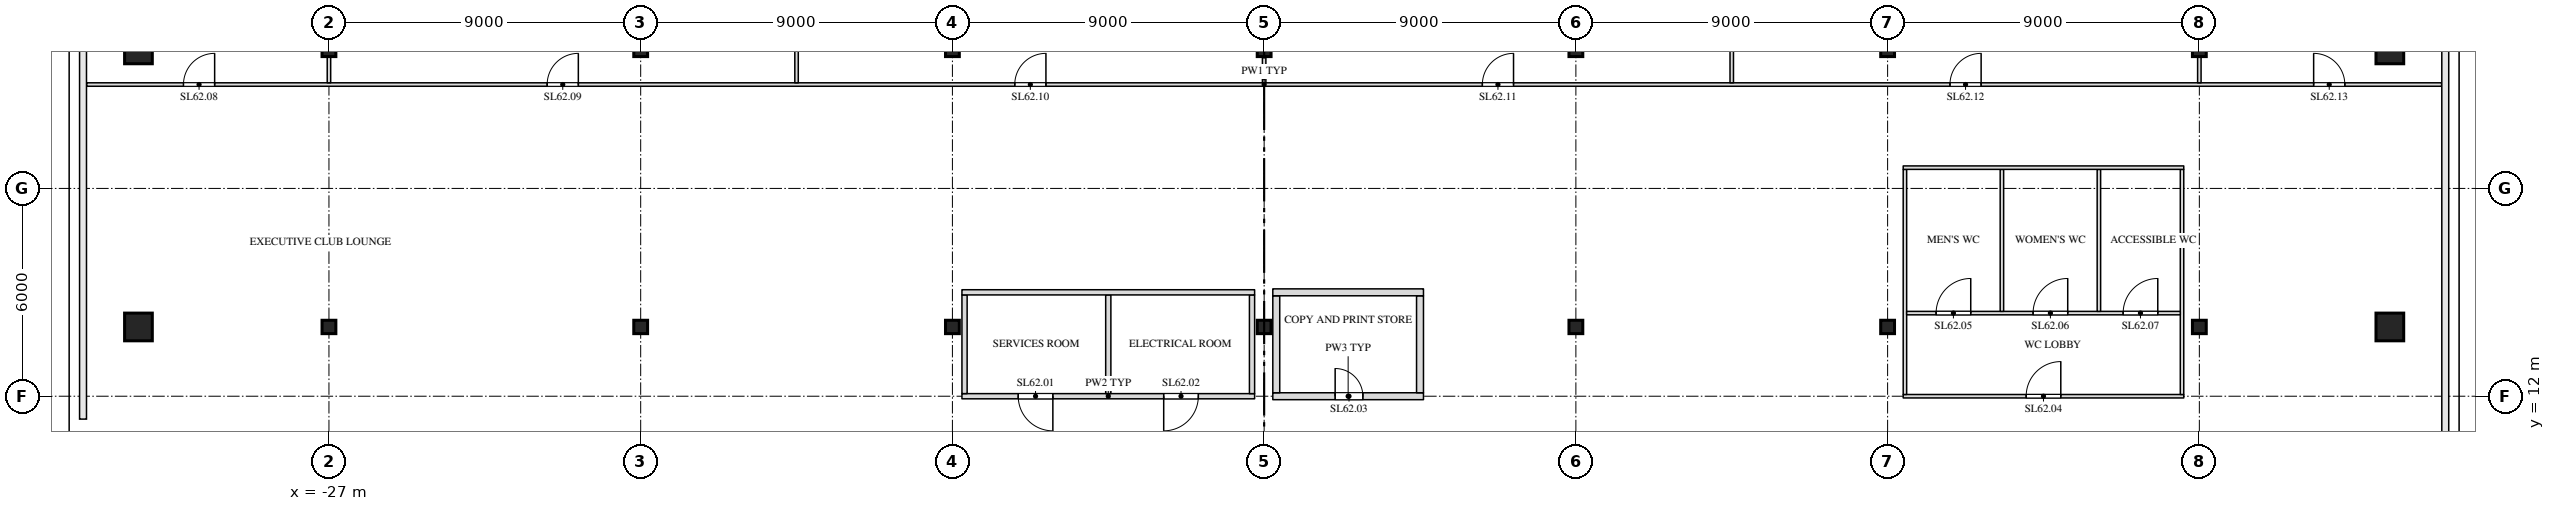
"""IFC4 building model, lengths in metres.
Left out: names, types, materials, properties, quantities, classifications, styles, units other than length and angle.
Written with IfcOpenShell. Run it as: python <this file> out.ifc"""

import sys

from ifc_helpers import new_model, si_unit, direction, frame, frame_2d, origin, origin_2d, place, context, subcontext, project, spatial, rectangle, i_section, extrude, element, fill, save


model = new_model("IFC4")
c1 = context("Model", 3, precision=1e-05, world=origin(), true_north=direction((0.0, 1.0)))
c2 = subcontext(c1, "Body", "Model", "MODEL_VIEW")
j1 = project(units=[si_unit("LENGTHUNIT", "METRE"), si_unit("PLANEANGLEUNIT", "RADIAN")], contexts=[c1])
p1 = place(None, origin())
s1 = spatial("IfcSite", under=j1, at=p1, CompositionType="ELEMENT")
p2 = place(p1, origin())
s2 = spatial("IfcBuilding", under=s1, at=p2, CompositionType="ELEMENT")
p3 = place(p2, frame((0.0, 0.0, 264.5)))
s3 = spatial("IfcBuildingStorey", under=s2, at=p3, CompositionType="ELEMENT", Elevation=264.5)
p4 = place(p3, frame((-32.5, 14.0, 0.0), z_axis=(0.0, 0.0, 1.0), x_axis=(1.0, 0.0, 0.0)))
e1 = element("IfcColumn", 1, at=p4, inside=s3, PredefinedType="COLUMN", context=c2, shape_type="SweptSolid", body=[
    extrude(rectangle(XDim=0.8, YDim=0.8, at=origin_2d()), origin(), (0.0, 0.0, 1.0), 4.0),
])
for number, where, z_axis, x_axis in (
    (2, (-27.0, 14.0, 0.0), (0.0, 0.0, 1.0), (1.0, 0.0, 0.0)),
    (3, (-18.0, 14.0, 0.0), (0.0, 0.0, 1.0), (1.0, 0.0, 0.0)),
    (4, (-9.0, 14.0, 0.0), (0.0, 0.0, 1.0), (1.0, 0.0, 0.0)),
    (5, (0.0, 14.0, 0.0), (0.0, 0.0, 1.0), (1.0, 0.0, 0.0)),
    (6, (9.0, 14.0, 0.0), (0.0, 0.0, 1.0), (1.0, 0.0, 0.0)),
    (7, (18.0, 14.0, 0.0), (0.0, 0.0, 1.0), (1.0, 0.0, 0.0)),
    (8, (27.0, 14.0, 0.0), (0.0, 0.0, 1.0), (1.0, 0.0, 0.0)),
):
    element("IfcColumn", number, at=place(p3, frame(where, z_axis=z_axis, x_axis=x_axis)), inside=s3, PredefinedType="COLUMN", context=c2, shape_type="SweptSolid", body=[
        extrude(i_section(OverallWidth=0.399, OverallDepth=0.386, WebThickness=0.021, FlangeThickness=0.033, at=origin_2d()), origin(), (0.0, 0.0, 1.0), 4.0),
    ])
for number, where, z_axis, x_axis in (
    (9, (32.5, 14.0, 0.0), (0.0, 0.0, 1.0), (1.0, 0.0, 0.0)),
    (10, (-32.5, 22.0, 0.0), (0.0, 0.0, 1.0), (1.0, 0.0, 0.0)),
):
    element("IfcColumn", number, at=place(p3, frame(where, z_axis=z_axis, x_axis=x_axis)), inside=s3, PredefinedType="COLUMN", context=c2, shape_type="SweptSolid", body=[
        extrude(rectangle(XDim=0.8, YDim=0.8, at=origin_2d()), origin(), (0.0, 0.0, 1.0), 4.0),
    ])
for number, where, z_axis, x_axis in (
    (11, (-27.0, 22.0, 0.0), (0.0, 0.0, 1.0), (1.0, 0.0, 0.0)),
    (12, (-18.0, 22.0, 0.0), (0.0, 0.0, 1.0), (1.0, 0.0, 0.0)),
    (13, (-9.0, 22.0, 0.0), (0.0, 0.0, 1.0), (1.0, 0.0, 0.0)),
    (14, (0.0, 22.0, 0.0), (0.0, 0.0, 1.0), (1.0, 0.0, 0.0)),
    (15, (9.0, 22.0, 0.0), (0.0, 0.0, 1.0), (1.0, 0.0, 0.0)),
    (16, (18.0, 22.0, 0.0), (0.0, 0.0, 1.0), (1.0, 0.0, 0.0)),
    (17, (27.0, 22.0, 0.0), (0.0, 0.0, 1.0), (1.0, 0.0, 0.0)),
):
    element("IfcColumn", number, at=place(p3, frame(where, z_axis=z_axis, x_axis=x_axis)), inside=s3, PredefinedType="COLUMN", context=c2, shape_type="SweptSolid", body=[
        extrude(i_section(OverallWidth=0.399, OverallDepth=0.386, WebThickness=0.021, FlangeThickness=0.033, at=origin_2d()), origin(), (0.0, 0.0, 1.0), 4.0),
    ])
p5 = place(p3, frame((32.5, 22.0, 0.0), z_axis=(0.0, 0.0, 1.0), x_axis=(1.0, 0.0, 0.0)))
e18 = element("IfcColumn", 18, at=p5, inside=s3, PredefinedType="COLUMN", context=c2, shape_type="SweptSolid", body=[
    extrude(rectangle(XDim=0.8, YDim=0.8, at=origin_2d()), origin(), (0.0, 0.0, 1.0), 4.0),
])
p6 = place(p3, frame((-8.725, 12.0, 0.0), z_axis=(0.0, 0.0, 1.0), x_axis=(1.0, 0.0, 0.0)))
e19 = element("IfcWall", 19, at=p6, inside=s3, PredefinedType="PARTITIONING", context=c2, shape_type="SweptSolid", body=[
    extrude(rectangle(XDim=8.45, YDim=0.15, at=frame_2d((4.225, 0.0))), origin(), (0.0, 0.0, 1.0), 3.65),
])
p7 = place(p6, frame((1.625, 0.0, 0.0)))
e20 = element("IfcOpeningElement", 20, at=p7, cuts=e19, PredefinedType="OPENING", context=c2, shape_type="SweptSolid", body=[
    extrude(rectangle(XDim=1.0, YDim=2.1, at=frame_2d((0.5, 1.05))), frame((0.0, 0.087, 0.0), z_axis=(0.0, -1.0, 0.0), x_axis=(1.0, 0.0, 0.0)), (0.0, 0.0, 1.0), 0.174),
])
p8 = place(p6, frame((5.825, 0.0, 0.0)))
e21 = element("IfcOpeningElement", 21, at=p8, cuts=e19, PredefinedType="OPENING", context=c2, shape_type="SweptSolid", body=[
    extrude(rectangle(XDim=1.0, YDim=2.1, at=frame_2d((0.5, 1.05))), frame((0.0, 0.087, 0.0), z_axis=(0.0, -1.0, 0.0), x_axis=(1.0, 0.0, 0.0)), (0.0, 0.0, 1.0), 0.174),
])
for number, where, z_axis, x_axis in (
    (22, (-8.65, 12.075, 0.0), (0.0, 0.0, 1.0), (0.0, 1.0, 0.0)),
    (23, (-4.5, 12.075, 0.0), (0.0, 0.0, 1.0), (0.0, 1.0, 0.0)),
    (24, (-0.35, 12.075, 0.0), (0.0, 0.0, 1.0), (0.0, 1.0, 0.0)),
):
    element("IfcWall", number, at=place(p3, frame(where, z_axis=z_axis, x_axis=x_axis)), inside=s3, PredefinedType="PARTITIONING", context=c2, shape_type="SweptSolid", body=[
        extrude(rectangle(XDim=2.85, YDim=0.15, at=frame_2d((1.425, 0.0))), origin(), (0.0, 0.0, 1.0), 3.65),
    ])
p9 = place(p3, frame((0.25, 12.0, 0.0), z_axis=(0.0, 0.0, 1.0), x_axis=(1.0, 0.0, 0.0)))
e25 = element("IfcWall", 25, at=p9, inside=s3, PredefinedType="PARTITIONING", context=c2, shape_type="SweptSolid", body=[
    extrude(rectangle(XDim=4.35, YDim=0.2, at=frame_2d((2.175, 0.0))), origin(), (0.0, 0.0, 1.0), 3.65),
])
p10 = place(p9, frame((1.8, 0.0, 0.0)))
e26 = element("IfcOpeningElement", 26, at=p10, cuts=e25, PredefinedType="OPENING", context=c2, shape_type="SweptSolid", body=[
    extrude(rectangle(XDim=0.8, YDim=2.1, at=frame_2d((0.4, 1.05))), frame((0.0, 0.112, 0.0), z_axis=(0.0, -1.0, 0.0), x_axis=(1.0, 0.0, 0.0)), (0.0, 0.0, 1.0), 0.224),
])
for number, where, z_axis, x_axis in (
    (27, (0.35, 12.1, 0.0), (0.0, 0.0, 1.0), (0.0, 1.0, 0.0)),
    (28, (4.5, 12.1, 0.0), (0.0, 0.0, 1.0), (0.0, 1.0, 0.0)),
):
    element("IfcWall", number, at=place(p3, frame(where, z_axis=z_axis, x_axis=x_axis)), inside=s3, PredefinedType="PARTITIONING", context=c2, shape_type="SweptSolid", body=[
        extrude(rectangle(XDim=2.8, YDim=0.2, at=frame_2d((1.4, 0.0))), origin(), (0.0, 0.0, 1.0), 3.65),
    ])
p11 = place(p3, frame((18.45, 12.0, 0.0), z_axis=(0.0, 0.0, 1.0), x_axis=(1.0, 0.0, 0.0)))
e29 = element("IfcWall", 29, at=p11, inside=s3, PredefinedType="PARTITIONING", context=c2, shape_type="SweptSolid", body=[
    extrude(rectangle(XDim=8.1, YDim=0.1, at=frame_2d((4.05, 0.0))), origin(), (0.0, 0.0, 1.0), 3.65),
])
p12 = place(p11, frame((3.55, 0.0, 0.0)))
e30 = element("IfcOpeningElement", 30, at=p12, cuts=e29, PredefinedType="OPENING", context=c2, shape_type="SweptSolid", body=[
    extrude(rectangle(XDim=1.0, YDim=2.1, at=frame_2d((0.5, 1.05))), frame((0.0, 0.062, 0.0), z_axis=(0.0, -1.0, 0.0), x_axis=(1.0, 0.0, 0.0)), (0.0, 0.0, 1.0), 0.124),
])
for number, where, z_axis, x_axis in (
    (31, (18.5, 12.05, 0.0), (0.0, 0.0, 1.0), (0.0, 1.0, 0.0)),
    (32, (26.5, 12.05, 0.0), (0.0, 0.0, 1.0), (0.0, 1.0, 0.0)),
):
    element("IfcWall", number, at=place(p3, frame(where, z_axis=z_axis, x_axis=x_axis)), inside=s3, PredefinedType="PARTITIONING", context=c2, shape_type="SweptSolid", body=[
        extrude(rectangle(XDim=6.5, YDim=0.1, at=frame_2d((3.25, 0.0))), origin(), (0.0, 0.0, 1.0), 3.65),
    ])
p13 = place(p3, frame((18.55, 14.4, 0.0), z_axis=(0.0, 0.0, 1.0), x_axis=(1.0, 0.0, 0.0)))
e33 = element("IfcWall", 33, at=p13, inside=s3, PredefinedType="PARTITIONING", context=c2, shape_type="SweptSolid", body=[
    extrude(rectangle(XDim=7.9, YDim=0.1, at=frame_2d((3.95, 0.0))), origin(), (0.0, 0.0, 1.0), 3.65),
])
p14 = place(p13, frame((0.85, 0.0, 0.0)))
e34 = element("IfcOpeningElement", 34, at=p14, cuts=e33, PredefinedType="OPENING", context=c2, shape_type="SweptSolid", body=[
    extrude(rectangle(XDim=1.0, YDim=2.1, at=frame_2d((0.5, 1.05))), frame((0.0, 0.062, 0.0), z_axis=(0.0, -1.0, 0.0), x_axis=(1.0, 0.0, 0.0)), (0.0, 0.0, 1.0), 0.124),
])
p15 = place(p13, frame((3.65, 0.0, 0.0)))
e35 = element("IfcOpeningElement", 35, at=p15, cuts=e33, PredefinedType="OPENING", context=c2, shape_type="SweptSolid", body=[
    extrude(rectangle(XDim=1.0, YDim=2.1, at=frame_2d((0.5, 1.05))), frame((0.0, 0.062, 0.0), z_axis=(0.0, -1.0, 0.0), x_axis=(1.0, 0.0, 0.0)), (0.0, 0.0, 1.0), 0.124),
])
p16 = place(p13, frame((6.25, 0.0, 0.0)))
e36 = element("IfcOpeningElement", 36, at=p16, cuts=e33, PredefinedType="OPENING", context=c2, shape_type="SweptSolid", body=[
    extrude(rectangle(XDim=1.0, YDim=2.1, at=frame_2d((0.5, 1.05))), frame((0.0, 0.062, 0.0), z_axis=(0.0, -1.0, 0.0), x_axis=(1.0, 0.0, 0.0)), (0.0, 0.0, 1.0), 0.124),
])
for number, where, z_axis, x_axis in (
    (37, (21.3, 14.45, 0.0), (0.0, 0.0, 1.0), (0.0, 1.0, 0.0)),
    (38, (24.1, 14.45, 0.0), (0.0, 0.0, 1.0), (0.0, 1.0, 0.0)),
):
    element("IfcWall", number, at=place(p3, frame(where, z_axis=z_axis, x_axis=x_axis)), inside=s3, PredefinedType="PARTITIONING", context=c2, shape_type="SweptSolid", body=[
        extrude(rectangle(XDim=4.1, YDim=0.1, at=frame_2d((2.05, 0.0))), origin(), (0.0, 0.0, 1.0), 3.65),
    ])
p17 = place(p3, frame((-8.725, 15.0, 0.0), z_axis=(0.0, 0.0, 1.0), x_axis=(1.0, 0.0, 0.0)))
e39 = element("IfcWall", 39, at=p17, inside=s3, PredefinedType="PARTITIONING", context=c2, shape_type="SweptSolid", body=[
    extrude(rectangle(XDim=8.45, YDim=0.15, at=frame_2d((4.225, 0.0))), origin(), (0.0, 0.0, 1.0), 3.65),
])
p18 = place(p3, frame((0.25, 15.0, 0.0), z_axis=(0.0, 0.0, 1.0), x_axis=(1.0, 0.0, 0.0)))
e40 = element("IfcWall", 40, at=p18, inside=s3, PredefinedType="PARTITIONING", context=c2, shape_type="SweptSolid", body=[
    extrude(rectangle(XDim=4.35, YDim=0.2, at=frame_2d((2.175, 0.0))), origin(), (0.0, 0.0, 1.0), 3.65),
])
p19 = place(p3, frame((18.45, 18.6, 0.0), z_axis=(0.0, 0.0, 1.0), x_axis=(1.0, 0.0, 0.0)))
e41 = element("IfcWall", 41, at=p19, inside=s3, PredefinedType="PARTITIONING", context=c2, shape_type="SweptSolid", body=[
    extrude(rectangle(XDim=8.1, YDim=0.1, at=frame_2d((4.05, 0.0))), origin(), (0.0, 0.0, 1.0), 3.65),
])
p20 = place(p3, frame((-33.996, 21.0, 0.0), z_axis=(0.0, 0.0, 1.0), x_axis=(1.0, 0.0, 0.0)))
e42 = element("IfcWall", 42, at=p20, inside=s3, PredefinedType="PARTITIONING", context=c2, shape_type="SweptSolid", body=[
    extrude(rectangle(XDim=67.992, YDim=0.1, at=frame_2d((33.996, 0.0))), origin(), (0.0, 0.0, 1.0), 3.65),
])
p21 = place(p20, frame((2.796, 0.0, 0.0)))
e43 = element("IfcOpeningElement", 43, at=p21, cuts=e42, PredefinedType="OPENING", context=c2, shape_type="SweptSolid", body=[
    extrude(rectangle(XDim=0.9, YDim=2.1, at=frame_2d((0.45, 1.05))), frame((0.0, 0.062, 0.0), z_axis=(0.0, -1.0, 0.0), x_axis=(1.0, 0.0, 0.0)), (0.0, 0.0, 1.0), 0.124),
])
p22 = place(p20, frame((13.296, 0.0, 0.0)))
e44 = element("IfcOpeningElement", 44, at=p22, cuts=e42, PredefinedType="OPENING", context=c2, shape_type="SweptSolid", body=[
    extrude(rectangle(XDim=0.9, YDim=2.1, at=frame_2d((0.45, 1.05))), frame((0.0, 0.062, 0.0), z_axis=(0.0, -1.0, 0.0), x_axis=(1.0, 0.0, 0.0)), (0.0, 0.0, 1.0), 0.124),
])
p23 = place(p20, frame((26.796, 0.0, 0.0)))
e45 = element("IfcOpeningElement", 45, at=p23, cuts=e42, PredefinedType="OPENING", context=c2, shape_type="SweptSolid", body=[
    extrude(rectangle(XDim=0.9, YDim=2.1, at=frame_2d((0.45, 1.05))), frame((0.0, 0.062, 0.0), z_axis=(0.0, -1.0, 0.0), x_axis=(1.0, 0.0, 0.0)), (0.0, 0.0, 1.0), 0.124),
])
p24 = place(p20, frame((40.296, 0.0, 0.0)))
e46 = element("IfcOpeningElement", 46, at=p24, cuts=e42, PredefinedType="OPENING", context=c2, shape_type="SweptSolid", body=[
    extrude(rectangle(XDim=0.9, YDim=2.1, at=frame_2d((0.45, 1.05))), frame((0.0, 0.062, 0.0), z_axis=(0.0, -1.0, 0.0), x_axis=(1.0, 0.0, 0.0)), (0.0, 0.0, 1.0), 0.124),
])
p25 = place(p20, frame((53.796, 0.0, 0.0)))
e47 = element("IfcOpeningElement", 47, at=p25, cuts=e42, PredefinedType="OPENING", context=c2, shape_type="SweptSolid", body=[
    extrude(rectangle(XDim=0.9, YDim=2.1, at=frame_2d((0.45, 1.05))), frame((0.0, 0.062, 0.0), z_axis=(0.0, -1.0, 0.0), x_axis=(1.0, 0.0, 0.0)), (0.0, 0.0, 1.0), 0.124),
])
p26 = place(p20, frame((64.296, 0.0, 0.0)))
e48 = element("IfcOpeningElement", 48, at=p26, cuts=e42, PredefinedType="OPENING", context=c2, shape_type="SweptSolid", body=[
    extrude(rectangle(XDim=0.9, YDim=2.1, at=frame_2d((0.45, 1.05))), frame((0.0, 0.062, 0.0), z_axis=(0.0, -1.0, 0.0), x_axis=(1.0, 0.0, 0.0)), (0.0, 0.0, 1.0), 0.124),
])
p27 = place(p3, frame((-27.0, 21.05, 0.0), z_axis=(0.0, 0.0, 1.0), x_axis=(0.0, 1.0, 0.0)))
e49 = element("IfcWall", 49, at=p27, inside=s3, PredefinedType="PARTITIONING", context=c2, shape_type="SweptSolid", body=[
    extrude(rectangle(XDim=0.757, YDim=0.1, at=frame_2d((0.378, 0.0))), origin(), (0.0, 0.0, 1.0), 3.043),
])
p28 = place(p3, frame((-13.5, 21.05, 0.0), z_axis=(0.0, 0.0, 1.0), x_axis=(0.0, 1.0, 0.0)))
e50 = element("IfcWall", 50, at=p28, inside=s3, PredefinedType="PARTITIONING", context=c2, shape_type="SweptSolid", body=[
    extrude(rectangle(XDim=9.95, YDim=0.1, at=frame_2d((4.975, 0.0))), origin(), (0.0, 0.0, 1.0), 3.65),
])
p29 = place(p3, frame((0.0, 21.05, 0.0), z_axis=(0.0, 0.0, 1.0), x_axis=(0.0, 1.0, 0.0)))
e51 = element("IfcWall", 51, at=p29, inside=s3, PredefinedType="PARTITIONING", context=c2, shape_type="SweptSolid", body=[
    extrude(rectangle(XDim=0.757, YDim=0.1, at=frame_2d((0.378, 0.0))), origin(), (0.0, 0.0, 1.0), 3.043),
])
p30 = place(p3, frame((13.5, 21.05, 0.0), z_axis=(0.0, 0.0, 1.0), x_axis=(0.0, 1.0, 0.0)))
e52 = element("IfcWall", 52, at=p30, inside=s3, PredefinedType="PARTITIONING", context=c2, shape_type="SweptSolid", body=[
    extrude(rectangle(XDim=9.95, YDim=0.1, at=frame_2d((4.975, 0.0))), origin(), (0.0, 0.0, 1.0), 3.65),
])
p31 = place(p3, frame((27.0, 21.05, 0.0), z_axis=(0.0, 0.0, 1.0), x_axis=(0.0, 1.0, 0.0)))
e53 = element("IfcWall", 53, at=p31, inside=s3, PredefinedType="PARTITIONING", context=c2, shape_type="SweptSolid", body=[
    extrude(rectangle(XDim=0.757, YDim=0.1, at=frame_2d((0.378, 0.0))), origin(), (0.0, 0.0, 1.0), 3.043),
])
p32 = place(p7, origin())
e54 = element("IfcDoor", 54, at=p32, inside=s3, OperationType="SINGLE_SWING_LEFT", PredefinedType="DOOR", context=c2, shape_type="SweptSolid", body=[
    extrude(rectangle(XDim=1.0, YDim=2.1, at=frame_2d((0.5, 1.05))), frame((0.0, 0.025, 0.0), z_axis=(0.0, -1.0, 0.0), x_axis=(1.0, 0.0, 0.0)), (0.0, 0.0, 1.0), 0.05),
])
fill(e20, e54)
p33 = place(p8, origin())
e55 = element("IfcDoor", 55, at=p33, inside=s3, OperationType="SINGLE_SWING_RIGHT", PredefinedType="DOOR", context=c2, shape_type="SweptSolid", body=[
    extrude(rectangle(XDim=1.0, YDim=2.1, at=frame_2d((0.5, 1.05))), frame((0.0, 0.025, 0.0), z_axis=(0.0, -1.0, 0.0), x_axis=(1.0, 0.0, 0.0)), (0.0, 0.0, 1.0), 0.05),
])
fill(e21, e55)
p34 = place(p10, origin())
e56 = element("IfcDoor", 56, at=p34, inside=s3, OperationType="SINGLE_SWING_LEFT", PredefinedType="DOOR", context=c2, shape_type="SweptSolid", body=[
    extrude(rectangle(XDim=0.8, YDim=2.1, at=frame_2d((0.4, 1.05))), frame((0.0, 0.025, 0.0), z_axis=(0.0, -1.0, 0.0), x_axis=(1.0, 0.0, 0.0)), (0.0, 0.0, 1.0), 0.05),
])
fill(e26, e56)
p35 = place(p12, origin())
e57 = element("IfcDoor", 57, at=p35, inside=s3, OperationType="SINGLE_SWING_RIGHT", PredefinedType="DOOR", context=c2, shape_type="SweptSolid", body=[
    extrude(rectangle(XDim=1.0, YDim=2.1, at=frame_2d((0.5, 1.05))), frame((0.0, 0.025, 0.0), z_axis=(0.0, -1.0, 0.0), x_axis=(1.0, 0.0, 0.0)), (0.0, 0.0, 1.0), 0.05),
])
fill(e30, e57)
p36 = place(p14, origin())
e58 = element("IfcDoor", 58, at=p36, inside=s3, OperationType="SINGLE_SWING_RIGHT", PredefinedType="DOOR", context=c2, shape_type="SweptSolid", body=[
    extrude(rectangle(XDim=1.0, YDim=2.1, at=frame_2d((0.5, 1.05))), frame((0.0, 0.025, 0.0), z_axis=(0.0, -1.0, 0.0), x_axis=(1.0, 0.0, 0.0)), (0.0, 0.0, 1.0), 0.05),
])
fill(e34, e58)
p37 = place(p15, origin())
e59 = element("IfcDoor", 59, at=p37, inside=s3, OperationType="SINGLE_SWING_RIGHT", PredefinedType="DOOR", context=c2, shape_type="SweptSolid", body=[
    extrude(rectangle(XDim=1.0, YDim=2.1, at=frame_2d((0.5, 1.05))), frame((0.0, 0.025, 0.0), z_axis=(0.0, -1.0, 0.0), x_axis=(1.0, 0.0, 0.0)), (0.0, 0.0, 1.0), 0.05),
])
fill(e35, e59)
p38 = place(p16, origin())
e60 = element("IfcDoor", 60, at=p38, inside=s3, OperationType="SINGLE_SWING_RIGHT", PredefinedType="DOOR", context=c2, shape_type="SweptSolid", body=[
    extrude(rectangle(XDim=1.0, YDim=2.1, at=frame_2d((0.5, 1.05))), frame((0.0, 0.025, 0.0), z_axis=(0.0, -1.0, 0.0), x_axis=(1.0, 0.0, 0.0)), (0.0, 0.0, 1.0), 0.05),
])
fill(e36, e60)
p39 = place(p21, origin())
e61 = element("IfcDoor", 61, at=p39, inside=s3, OperationType="SINGLE_SWING_RIGHT", PredefinedType="DOOR", context=c2, shape_type="SweptSolid", body=[
    extrude(rectangle(XDim=0.9, YDim=2.1, at=frame_2d((0.45, 1.05))), frame((0.0, 0.025, 0.0), z_axis=(0.0, -1.0, 0.0), x_axis=(1.0, 0.0, 0.0)), (0.0, 0.0, 1.0), 0.05),
])
fill(e43, e61)
p40 = place(p22, origin())
e62 = element("IfcDoor", 62, at=p40, inside=s3, OperationType="SINGLE_SWING_RIGHT", PredefinedType="DOOR", context=c2, shape_type="SweptSolid", body=[
    extrude(rectangle(XDim=0.9, YDim=2.1, at=frame_2d((0.45, 1.05))), frame((0.0, 0.025, 0.0), z_axis=(0.0, -1.0, 0.0), x_axis=(1.0, 0.0, 0.0)), (0.0, 0.0, 1.0), 0.05),
])
fill(e44, e62)
p41 = place(p23, origin())
e63 = element("IfcDoor", 63, at=p41, inside=s3, OperationType="SINGLE_SWING_RIGHT", PredefinedType="DOOR", context=c2, shape_type="SweptSolid", body=[
    extrude(rectangle(XDim=0.9, YDim=2.1, at=frame_2d((0.45, 1.05))), frame((0.0, 0.025, 0.0), z_axis=(0.0, -1.0, 0.0), x_axis=(1.0, 0.0, 0.0)), (0.0, 0.0, 1.0), 0.05),
])
fill(e45, e63)
p42 = place(p24, origin())
e64 = element("IfcDoor", 64, at=p42, inside=s3, OperationType="SINGLE_SWING_RIGHT", PredefinedType="DOOR", context=c2, shape_type="SweptSolid", body=[
    extrude(rectangle(XDim=0.9, YDim=2.1, at=frame_2d((0.45, 1.05))), frame((0.0, 0.025, 0.0), z_axis=(0.0, -1.0, 0.0), x_axis=(1.0, 0.0, 0.0)), (0.0, 0.0, 1.0), 0.05),
])
fill(e46, e64)
p43 = place(p25, origin())
e65 = element("IfcDoor", 65, at=p43, inside=s3, OperationType="SINGLE_SWING_RIGHT", PredefinedType="DOOR", context=c2, shape_type="SweptSolid", body=[
    extrude(rectangle(XDim=0.9, YDim=2.1, at=frame_2d((0.45, 1.05))), frame((0.0, 0.025, 0.0), z_axis=(0.0, -1.0, 0.0), x_axis=(1.0, 0.0, 0.0)), (0.0, 0.0, 1.0), 0.05),
])
fill(e47, e65)
p44 = place(p26, origin())
e66 = element("IfcDoor", 66, at=p44, inside=s3, OperationType="SINGLE_SWING_LEFT", PredefinedType="DOOR", context=c2, shape_type="SweptSolid", body=[
    extrude(rectangle(XDim=0.9, YDim=2.1, at=frame_2d((0.45, 1.05))), frame((0.0, 0.025, 0.0), z_axis=(0.0, -1.0, 0.0), x_axis=(1.0, 0.0, 0.0)), (0.0, 0.0, 1.0), 0.05),
])
fill(e48, e66)
save(model, sys.argv[1])
